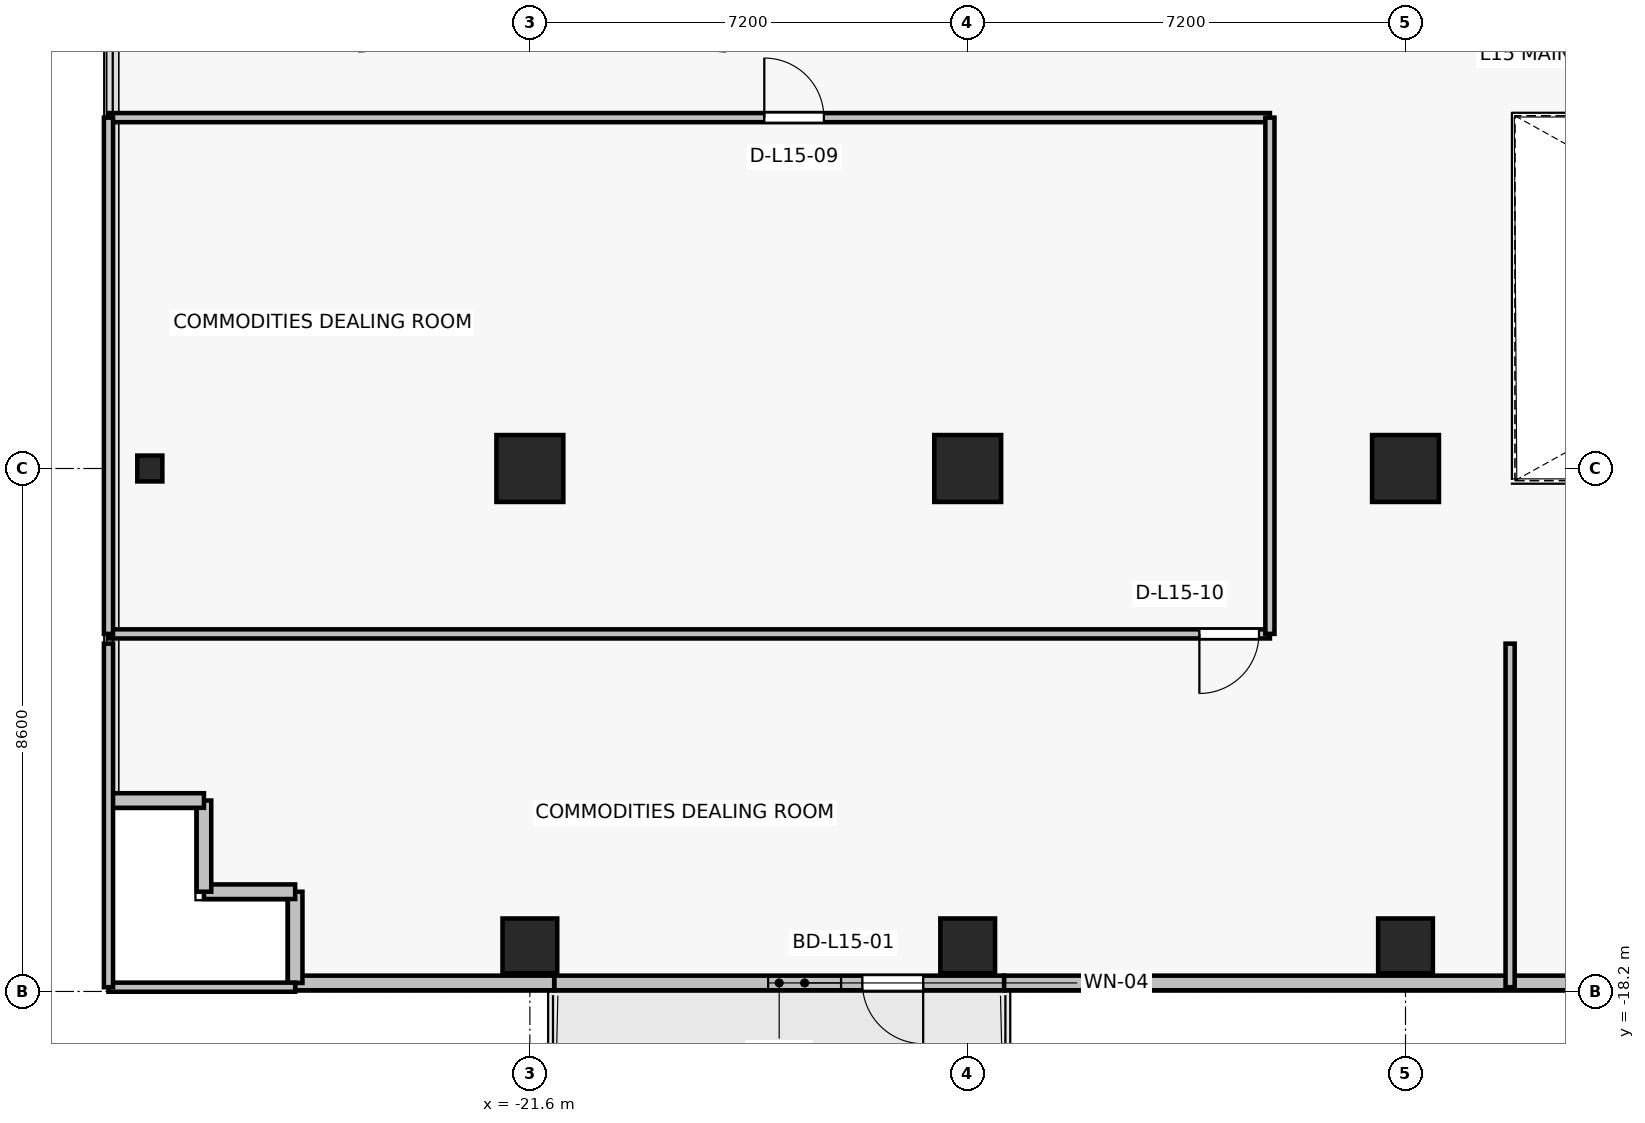
"""IFC4 building model, lengths in metres.
Left out: names, types, materials, properties, quantities, classifications, styles, units other than length and angle.
Written with IfcOpenShell. Run it as: python <this file> out.ifc"""

import sys

from ifc_helpers import new_model, si_unit, direction, frame, frame_2d, origin, origin_2d, place, context, subcontext, project, spatial, rectangle, i_section, extrude, source, transform, mapped, element, fill, save


model = new_model("IFC4")
c1 = context("Model", 3, precision=1e-05, world=origin(), true_north=direction((0.0, 1.0)))
c2 = subcontext(c1, "Body", "Model", "MODEL_VIEW")
j1 = project(units=[si_unit("LENGTHUNIT", "METRE"), si_unit("PLANEANGLEUNIT", "RADIAN")], contexts=[c1])
p1 = place(None, origin())
s1 = spatial("IfcSite", under=j1, at=p1, CompositionType="ELEMENT")
p2 = place(p1, origin())
s2 = spatial("IfcBuilding", under=s1, at=p2, CompositionType="ELEMENT")
p3 = place(p2, frame((0.0, 0.0, 57.1)))
s3 = spatial("IfcBuildingStorey", under=s2, at=p3, CompositionType="ELEMENT", Elevation=57.1)
for number, where, z_axis, x_axis in (
    (1, (-14.4, -9.6, 0.0), (0.0, 0.0, 1.0), (1.0, 0.0, 0.0)),
    (2, (-7.2, -9.6, 0.0), (0.0, 0.0, 1.0), (1.0, 0.0, 0.0)),
    (3, (-21.6, -9.6, 0.0), (0.0, 0.0, 1.0), (1.0, 0.0, 0.0)),
):
    element("IfcColumn", number, at=place(p3, frame(where, z_axis=z_axis, x_axis=x_axis)), inside=s3, PredefinedType="COLUMN", context=c2, shape_type="SweptSolid", body=[
        extrude(rectangle(XDim=1.1, YDim=1.1, at=origin_2d()), origin(), (0.0, 0.0, 1.0), 3.3),
    ])
for number, where, z_axis, x_axis in (
    (4, (-14.4, -17.45, 0.0), (0.0, 0.0, 1.0), (1.0, 0.0, 0.0)),
    (5, (-7.2, -17.45, 0.0), (0.0, 0.0, 1.0), (1.0, 0.0, 0.0)),
    (6, (-21.6, -17.45, 0.0), (0.0, 0.0, 1.0), (1.0, 0.0, 0.0)),
):
    element("IfcColumn", number, at=place(p3, frame(where, z_axis=z_axis, x_axis=x_axis)), inside=s3, PredefinedType="COLUMN", context=c2, shape_type="SweptSolid", body=[
        extrude(rectangle(XDim=0.9, YDim=0.9, at=origin_2d()), origin(), (0.0, 0.0, 1.0), 3.3),
    ])
p4 = place(p3, frame((-27.85, -9.6, 0.0), z_axis=(0.0, 0.0, 1.0), x_axis=(1.0, 0.0, 0.0)))
e7 = element("IfcColumn", 7, at=p4, inside=s3, PredefinedType="COLUMN", context=c2, shape_type="SweptSolid", body=[
    extrude(i_section(OverallWidth=0.412, OverallDepth=0.425, WebThickness=0.026, FlangeThickness=0.039, FilletRadius=0.015, at=origin_2d()), origin(), (0.0, 0.0, 1.0), 3.3),
])
p5 = place(p3, frame((-13.8, -18.06, 0.0), z_axis=(0.0, 0.0, 1.0), x_axis=(-1.0, 0.0, 0.0)))
e8 = element("IfcWall", 8, at=p5, inside=s3, PredefinedType="SOLIDWALL", context=c2, shape_type="SweptSolid", body=[
    extrude(rectangle(XDim=7.4, YDim=0.24, at=frame_2d((3.7, 0.0))), origin(), (0.0, 0.0, 1.0), 2.665),
])
p6 = place(p5, frame((1.332, 0.0, 0.0)))
e9 = element("IfcOpeningElement", 9, at=p6, cuts=e8, PredefinedType="OPENING", context=c2, shape_type="SweptSolid", body=[
    extrude(rectangle(XDim=1.0, YDim=2.2, at=frame_2d((0.5, 1.1))), frame((0.0, 0.13, 0.0), z_axis=(0.0, -1.0, 0.0), x_axis=(1.0, 0.0, 0.0)), (0.0, 0.0, 1.0), 0.26),
])
p7 = place(p5, frame((2.682, 0.0, 0.85)))
e10 = element("IfcOpeningElement", 10, at=p7, cuts=e8, PredefinedType="OPENING", context=c2, shape_type="SweptSolid", body=[
    extrude(rectangle(XDim=1.2, YDim=1.5, at=frame_2d((0.6, 0.75))), frame((0.0, 0.13, 0.0), z_axis=(0.0, -1.0, 0.0), x_axis=(1.0, 0.0, 0.0)), (0.0, 0.0, 1.0), 0.26),
])
p8 = place(p3, frame((-13.8, -18.06, 0.0), z_axis=(0.0, 0.0, 1.0), x_axis=(1.0, 0.0, 0.0)))
e11 = element("IfcWall", 11, at=p8, inside=s3, PredefinedType="SOLIDWALL", context=c2, shape_type="SweptSolid", body=[
    extrude(rectangle(XDim=10.46, YDim=0.24, at=frame_2d((5.23, 0.0))), origin(), (0.0, 0.0, 1.0), 2.665),
])
p9 = place(p3, frame((-25.46, -18.06, 0.0), z_axis=(0.0, 0.0, 1.0), x_axis=(1.0, 0.0, 0.0)))
e12 = element("IfcWall", 12, at=p9, inside=s3, PredefinedType="SOLIDWALL", context=c2, shape_type="SweptSolid", body=[
    extrude(rectangle(XDim=4.26, YDim=0.24, at=frame_2d((2.13, 0.0))), origin(), (0.0, 0.0, 1.0), 3.075),
])
for number, where, z_axis, x_axis in (
    (13, (-25.46, -16.56, 0.0), (0.0, 0.0, 1.0), (0.0, -1.0, 0.0)),
    (14, (-26.96, -16.56, 0.0), (0.0, 0.0, 1.0), (1.0, 0.0, 0.0)),
    (15, (-26.96, -15.06, 0.0), (0.0, 0.0, 1.0), (0.0, -1.0, 0.0)),
    (16, (-28.46, -15.06, 0.0), (0.0, 0.0, 1.0), (1.0, 0.0, 0.0)),
):
    element("IfcWall", number, at=place(p3, frame(where, z_axis=z_axis, x_axis=x_axis)), inside=s3, PredefinedType="SOLIDWALL", context=c2, shape_type="SweptSolid", body=[
        extrude(rectangle(XDim=1.5, YDim=0.24, at=frame_2d((0.75, 0.0))), origin(), (0.0, 0.0, 1.0), 3.075),
    ])
p10 = place(p3, frame((-9.43, -12.32, 0.0), z_axis=(0.0, 0.0, 1.0), x_axis=(-1.0, 0.0, 0.0)))
e17 = element("IfcWall", 17, at=p10, inside=s3, PredefinedType="PARTITIONING", context=c2, shape_type="SweptSolid", body=[
    extrude(rectangle(XDim=19.1, YDim=0.15, at=frame_2d((9.55, 0.0))), origin(), (0.0, 0.0, 1.0), 2.465),
])
p11 = place(p10, frame((0.18, 0.0, 0.0)))
e18 = element("IfcOpeningElement", 18, at=p11, cuts=e17, PredefinedType="OPENING", context=c2, shape_type="SweptSolid", body=[
    extrude(rectangle(XDim=0.98, YDim=2.15, at=frame_2d((0.49, 1.075))), frame((0.0, 0.085, 0.0), z_axis=(0.0, -1.0, 0.0), x_axis=(1.0, 0.0, 0.0)), (0.0, 0.0, 1.0), 0.17),
])
p12 = place(p3, frame((-28.53, -3.83, 0.0), z_axis=(0.0, 0.0, 1.0), x_axis=(1.0, 0.0, 0.0)))
e19 = element("IfcWall", 19, at=p12, inside=s3, PredefinedType="PARTITIONING", context=c2, shape_type="SweptSolid", body=[
    extrude(rectangle(XDim=19.1, YDim=0.15, at=frame_2d((9.55, 0.0))), origin(), (0.0, 0.0, 1.0), 2.465),
])
p13 = place(p12, frame((10.785, 0.0, 0.0)))
e20 = element("IfcOpeningElement", 20, at=p13, cuts=e19, PredefinedType="OPENING", context=c2, shape_type="SweptSolid", body=[
    extrude(rectangle(XDim=0.98, YDim=2.15, at=frame_2d((0.49, 1.075))), frame((0.0, 0.085, 0.0), z_axis=(0.0, -1.0, 0.0), x_axis=(1.0, 0.0, 0.0)), (0.0, 0.0, 1.0), 0.17),
])
p14 = place(p3, frame((-28.53, -12.32, 0.0), z_axis=(0.0, 0.0, 1.0), x_axis=(0.0, 1.0, 0.0)))
e21 = element("IfcWall", 21, at=p14, inside=s3, PredefinedType="PARTITIONING", context=c2, shape_type="SweptSolid", body=[
    extrude(rectangle(XDim=8.49, YDim=0.15, at=frame_2d((4.245, 0.0))), origin(), (0.0, 0.0, 1.0), 2.665),
])
p15 = place(p3, frame((-9.43, -3.83, 0.0), z_axis=(0.0, 0.0, 1.0), x_axis=(0.0, -1.0, 0.0)))
e22 = element("IfcWall", 22, at=p15, inside=s3, PredefinedType="PARTITIONING", context=c2, shape_type="SweptSolid", body=[
    extrude(rectangle(XDim=8.49, YDim=0.15, at=frame_2d((4.245, 0.0))), origin(), (0.0, 0.0, 1.0), 2.465),
])
p16 = place(p3, frame((-25.46, -18.13, 0.0), z_axis=(0.0, 0.0, 1.0), x_axis=(-1.0, 0.0, 0.0)))
e23 = element("IfcWall", 23, at=p16, inside=s3, PredefinedType="PARTITIONING", context=c2, shape_type="SweptSolid", body=[
    extrude(rectangle(XDim=3.07, YDim=0.15, at=frame_2d((1.535, 0.0))), origin(), (0.0, 0.0, 1.0), 2.665),
])
p17 = place(p3, frame((-28.53, -18.13, 0.0), z_axis=(0.0, 0.0, 1.0), x_axis=(0.0, 1.0, 0.0)))
e24 = element("IfcWall", 24, at=p17, inside=s3, PredefinedType="PARTITIONING", context=c2, shape_type="SweptSolid", body=[
    extrude(rectangle(XDim=5.65, YDim=0.15, at=frame_2d((2.825, 0.0))), origin(), (0.0, 0.0, 1.0), 3.075),
])
p18 = place(p3, frame((-5.48, -12.48, 0.0), z_axis=(0.0, 0.0, 1.0), x_axis=(0.0, -1.0, 0.0)))
e25 = element("IfcWall", 25, at=p18, inside=s3, PredefinedType="PARTITIONING", context=c2, shape_type="SweptSolid", body=[
    extrude(rectangle(XDim=5.65, YDim=0.15, at=frame_2d((2.825, 0.0))), origin(), (0.0, 0.0, 1.0), 2.465),
])
m1 = source(origin(), c2, "Body", "SweptSolid", [
    extrude(rectangle(XDim=1.0, YDim=2.2, at=frame_2d((0.5, 1.1))), frame((0.0, 0.025, 0.0), z_axis=(0.0, -1.0, 0.0), x_axis=(1.0, 0.0, 0.0)), (0.0, 0.0, 1.0), 0.05),
])
p19 = place(p6, origin())
e26 = element("IfcDoor", 26, at=p19, inside=s3, OperationType="SINGLE_SWING_LEFT", PredefinedType="DOOR", context=c2, shape_type="MappedRepresentation", body=[
    mapped(m1, transform((0.0, 0.0, 0.0), x_axis=(1.0, 0.0, 0.0), y_axis=(0.0, 1.0, 0.0), z_axis=(0.0, 0.0, 1.0), scale=1.0)),
])
fill(e9, e26)
m2 = source(origin(), c2, "Body", "SweptSolid", [
    extrude(rectangle(XDim=1.2, YDim=1.5, at=frame_2d((0.6, 0.75))), frame((0.0, 0.03, 0.0), z_axis=(0.0, -1.0, 0.0), x_axis=(1.0, 0.0, 0.0)), (0.0, 0.0, 1.0), 0.06),
])
p20 = place(p7, origin())
e27 = element("IfcWindow", 27, at=p20, inside=s3, PartitioningType="SINGLE_PANEL", PredefinedType="WINDOW", context=c2, shape_type="MappedRepresentation", body=[
    mapped(m2, transform((0.0, 0.0, 0.0), x_axis=(1.0, 0.0, 0.0), y_axis=(0.0, 1.0, 0.0), z_axis=(0.0, 0.0, 1.0), scale=1.0)),
])
fill(e10, e27)
m3 = source(origin(), c2, "Body", "SweptSolid", [
    extrude(rectangle(XDim=0.98, YDim=2.15, at=frame_2d((0.49, 1.075))), frame((0.0, 0.025, 0.0), z_axis=(0.0, -1.0, 0.0), x_axis=(1.0, 0.0, 0.0)), (0.0, 0.0, 1.0), 0.05),
])
p21 = place(p13, origin())
e28 = element("IfcDoor", 28, at=p21, inside=s3, OperationType="SINGLE_SWING_LEFT", PredefinedType="DOOR", context=c2, shape_type="MappedRepresentation", body=[
    mapped(m3, transform((0.0, 0.0, 0.0), x_axis=(1.0, 0.0, 0.0), y_axis=(0.0, 1.0, 0.0), z_axis=(0.0, 0.0, 1.0), scale=1.0)),
])
fill(e20, e28)
p22 = place(p11, origin())
e29 = element("IfcDoor", 29, at=p22, inside=s3, OperationType="SINGLE_SWING_RIGHT", PredefinedType="DOOR", context=c2, shape_type="MappedRepresentation", body=[
    mapped(m3, transform((0.0, 0.0, 0.0), x_axis=(1.0, 0.0, 0.0), y_axis=(0.0, 1.0, 0.0), z_axis=(0.0, 0.0, 1.0), scale=1.0)),
])
fill(e18, e29)
save(model, sys.argv[1])
